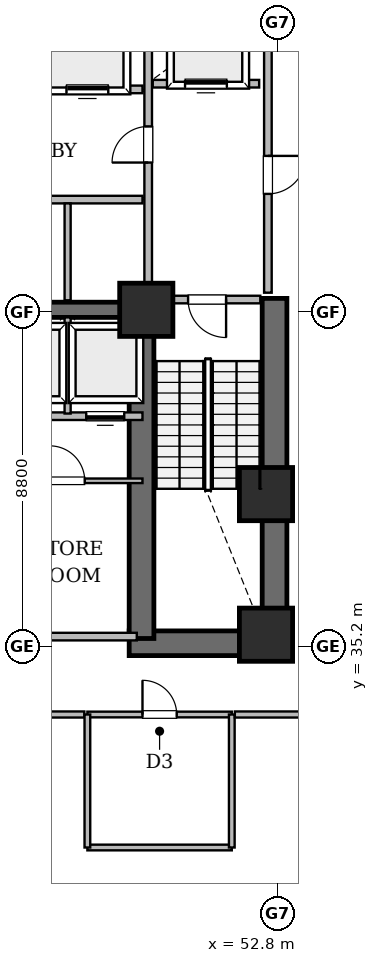
"""IFC4 building model, lengths in metres.
Left out: names, types, materials, properties, quantities, classifications, styles, units other than length and angle.
Written with IfcOpenShell. Run it as: python <this file> out.ifc"""

import sys

from ifc_helpers import new_model, si_unit, direction, frame, frame_2d, origin, origin_2d, place, context, subcontext, project, spatial, rectangle, extrude, element, fill, save


model = new_model("IFC4")
c1 = context("Model", 3, precision=1e-05, world=origin(), true_north=direction((0.0, 1.0)))
c2 = subcontext(c1, "Body", "Model", "MODEL_VIEW")
j1 = project(units=[si_unit("LENGTHUNIT", "METRE"), si_unit("PLANEANGLEUNIT", "RADIAN")], contexts=[c1])
p1 = place(None, origin())
s1 = spatial("IfcSite", under=j1, at=p1, CompositionType="ELEMENT")
p2 = place(p1, origin())
s2 = spatial("IfcBuilding", under=s1, at=p2, CompositionType="ELEMENT")
p3 = place(p2, frame((0.0, 0.0, 19.2)))
s3 = spatial("IfcBuildingStorey", under=s2, at=p3, CompositionType="ELEMENT", Elevation=19.2)
p4 = place(p3, frame((48.9, 35.275, 0.0), z_axis=(0.0, 0.0, 1.0), x_axis=(1.0, 0.0, 0.0)))
e1 = element("IfcWall", 1, at=p4, inside=s3, PredefinedType="SHEAR", context=c2, shape_type="SweptSolid", body=[
    extrude(rectangle(XDim=4.15, YDim=0.65, at=frame_2d((2.075, 0.0))), origin(), (0.0, 0.0, 1.0), 4.35),
])
p5 = place(p3, frame((52.725, 34.95, 0.0), z_axis=(0.0, 0.0, 1.0), x_axis=(0.0, 1.0, 0.0)))
e2 = element("IfcWall", 2, at=p5, inside=s3, PredefinedType="SHEAR", context=c2, shape_type="SweptSolid", body=[
    extrude(rectangle(XDim=9.4, YDim=0.65, at=frame_2d((4.7, 0.0))), origin(), (0.0, 0.0, 1.0), 4.35),
])
p6 = place(p3, frame((49.225, 35.4, 0.0), z_axis=(0.0, 0.0, 1.0), x_axis=(0.0, 1.0, 0.0)))
e3 = element("IfcWall", 3, at=p6, inside=s3, PredefinedType="SHEAR", context=c2, shape_type="SweptSolid", body=[
    extrude(rectangle(XDim=8.95, YDim=0.65, at=frame_2d((4.475, 0.0))), origin(), (0.0, 0.0, 1.0), 4.35),
])
p7 = place(p3, frame((45.05, 44.05, 0.0), z_axis=(0.0, 0.0, 1.0), x_axis=(1.0, 0.0, 0.0)))
e4 = element("IfcWall", 4, at=p7, inside=s3, PredefinedType="SHEAR", context=c2, shape_type="SweptSolid", body=[
    extrude(rectangle(XDim=4.2, YDim=0.4, at=frame_2d((2.1, 0.0))), origin(), (0.0, 0.0, 1.0), 4.35),
])
for number, where, z_axis, x_axis in (
    (5, (52.5, 35.5, 0.0), (0.0, 0.0, 1.0), (1.0, 0.0, 0.0)),
    (6, (52.5, 39.2, 0.0), (0.0, 0.0, 1.0), (1.0, 0.0, 0.0)),
    (7, (49.35, 44.05, 0.0), (0.0, 0.0, 1.0), (1.0, 0.0, 0.0)),
):
    element("IfcColumn", number, at=place(p3, frame(where, z_axis=z_axis, x_axis=x_axis)), inside=s3, PredefinedType="COLUMN", context=c2, shape_type="SweptSolid", body=[
        extrude(rectangle(XDim=1.4, YDim=1.4, at=origin_2d()), origin(), (0.0, 0.0, 1.0), 4.8),
    ])
p8 = place(p3, frame((38.9, 35.45, 0.0), z_axis=(0.0, 0.0, 1.0), x_axis=(1.0, 0.0, 0.0)))
e8 = element("IfcWall", 8, at=p8, inside=s3, PredefinedType="SOLIDWALL", context=c2, shape_type="SweptSolid", body=[
    extrude(rectangle(XDim=10.2, YDim=0.2, at=frame_2d((5.1, 0.0))), origin(), (0.0, 0.0, 1.0), 4.35),
])
p9 = place(p8, frame((4.6, 0.0, 0.0)))
e9 = element("IfcOpeningElement", 9, at=p9, cuts=e8, PredefinedType="OPENING", context=c2, shape_type="SweptSolid", body=[
    extrude(rectangle(XDim=1.0, YDim=2.15, at=frame_2d((0.5, 1.075))), frame((0.0, 0.11, 0.0), z_axis=(0.0, -1.0, 0.0), x_axis=(1.0, 0.0, 0.0)), (0.0, 0.0, 1.0), 0.22),
])
p10 = place(p3, frame((52.55, 44.5, 0.0), z_axis=(0.0, 0.0, 1.0), x_axis=(0.0, 1.0, 0.0)))
e10 = element("IfcWall", 10, at=p10, inside=s3, PredefinedType="SOLIDWALL", context=c2, shape_type="SweptSolid", body=[
    extrude(rectangle(XDim=7.92, YDim=0.2, at=frame_2d((3.96, 0.0))), origin(), (0.0, 0.0, 1.0), 4.35),
])
p11 = place(p10, frame((2.6, 0.0, 0.0)))
e11 = element("IfcOpeningElement", 11, at=p11, cuts=e10, PredefinedType="OPENING", context=c2, shape_type="SweptSolid", body=[
    extrude(rectangle(XDim=1.0, YDim=2.15, at=frame_2d((0.5, 1.075))), frame((0.0, 0.11, 0.0), z_axis=(0.0, -1.0, 0.0), x_axis=(1.0, 0.0, 0.0)), (0.0, 0.0, 1.0), 0.22),
])
p12 = place(p3, frame((49.4, 44.5, 0.0), z_axis=(0.0, 0.0, 1.0), x_axis=(0.0, 1.0, 0.0)))
e12 = element("IfcWall", 12, at=p12, inside=s3, PredefinedType="SOLIDWALL", context=c2, shape_type="SweptSolid", body=[
    extrude(rectangle(XDim=7.92, YDim=0.2, at=frame_2d((3.96, 0.0))), origin(), (0.0, 0.0, 1.0), 3.438),
])
p13 = place(p12, frame((3.425, 0.0, 0.0)))
e13 = element("IfcOpeningElement", 13, at=p13, cuts=e12, PredefinedType="OPENING", context=c2, shape_type="SweptSolid", body=[
    extrude(rectangle(XDim=0.95, YDim=2.15, at=frame_2d((0.475, 1.075))), frame((0.0, 0.11, 0.0), z_axis=(0.0, -1.0, 0.0), x_axis=(1.0, 0.0, 0.0)), (0.0, 0.0, 1.0), 0.22),
])
p14 = place(p3, frame((43.75, 49.85, 0.0), z_axis=(0.0, 0.0, 1.0), x_axis=(1.0, 0.0, 0.0)))
e14 = element("IfcWall", 14, at=p14, inside=s3, PredefinedType="SOLIDWALL", context=c2, shape_type="SweptSolid", body=[
    extrude(rectangle(XDim=5.5, YDim=0.2, at=frame_2d((2.75, 0.0))), origin(), (0.0, 0.0, 1.0), 3.438),
])
p15 = place(p14, frame((3.5, 0.0, 0.0)))
e15 = element("IfcOpeningElement", 15, at=p15, cuts=e14, PredefinedType="OPENING", context=c2, shape_type="SweptSolid", body=[
    extrude(rectangle(XDim=1.1, YDim=2.15, at=frame_2d((0.55, 1.075))), frame((0.0, 0.11, 0.0), z_axis=(0.0, -1.0, 0.0), x_axis=(1.0, 0.0, 0.0)), (0.0, 0.0, 1.0), 0.22),
])
p16 = place(p3, frame((45.32, 41.25, 0.0), z_axis=(0.0, 0.0, 1.0), x_axis=(1.0, 0.0, 0.0)))
e16 = element("IfcWall", 16, at=p16, inside=s3, PredefinedType="SOLIDWALL", context=c2, shape_type="SweptSolid", body=[
    extrude(rectangle(XDim=3.93, YDim=0.2, at=frame_2d((1.965, 0.0))), origin(), (0.0, 0.0, 1.0), 4.35),
])
p17 = place(p16, frame((0.45, 0.0, 0.0)))
e17 = element("IfcOpeningElement", 17, at=p17, cuts=e16, PredefinedType="OPENING", context=c2, shape_type="SweptSolid", body=[
    extrude(rectangle(XDim=1.0, YDim=2.15, at=frame_2d((0.5, 1.075))), frame((0.0, 0.11, 0.0), z_axis=(0.0, -1.0, 0.0), x_axis=(1.0, 0.0, 0.0)), (0.0, 0.0, 1.0), 0.22),
])
p18 = place(p16, frame((2.45, 0.0, 0.0)))
e18 = element("IfcOpeningElement", 18, at=p18, cuts=e16, PredefinedType="OPENING", context=c2, shape_type="SweptSolid", body=[
    extrude(rectangle(XDim=1.0, YDim=2.15, at=frame_2d((0.5, 1.075))), frame((0.0, 0.11, 0.0), z_axis=(0.0, -1.0, 0.0), x_axis=(1.0, 0.0, 0.0)), (0.0, 0.0, 1.0), 0.22),
])
p19 = place(p3, frame((45.32, 39.55, 0.0), z_axis=(0.0, 0.0, 1.0), x_axis=(1.0, 0.0, 0.0)))
e19 = element("IfcWall", 19, at=p19, inside=s3, PredefinedType="PARTITIONING", context=c2, shape_type="SweptSolid", body=[
    extrude(rectangle(XDim=3.93, YDim=0.12, at=frame_2d((1.965, 0.0))), origin(), (0.0, 0.0, 1.0), 4.35),
])
p20 = place(p19, frame((1.49, 0.0, 0.0)))
e20 = element("IfcOpeningElement", 20, at=p20, cuts=e19, PredefinedType="OPENING", context=c2, shape_type="SweptSolid", body=[
    extrude(rectangle(XDim=0.92, YDim=2.1, at=frame_2d((0.46, 1.05))), frame((0.0, 0.07, 0.0), z_axis=(0.0, -1.0, 0.0), x_axis=(1.0, 0.0, 0.0)), (0.0, 0.0, 1.0), 0.14),
])
p21 = place(p3, frame((47.8, 33.4, 0.0), z_axis=(0.0, 0.0, 1.0), x_axis=(1.0, 0.0, 0.0)))
e21 = element("IfcWall", 21, at=p21, inside=s3, PredefinedType="PLUMBINGWALL", context=c2, shape_type="SweptSolid", body=[
    extrude(rectangle(XDim=3.8, YDim=0.15, at=frame_2d((1.9, 0.0))), origin(), (0.0, 0.0, 1.0), 3.638),
])
p22 = place(p21, frame((1.45, 0.0, 0.0)))
e22 = element("IfcOpeningElement", 22, at=p22, cuts=e21, PredefinedType="OPENING", context=c2, shape_type="SweptSolid", body=[
    extrude(rectangle(XDim=0.9, YDim=2.1, at=frame_2d((0.45, 1.05))), frame((0.0, 0.085, 0.0), z_axis=(0.0, -1.0, 0.0), x_axis=(1.0, 0.0, 0.0)), (0.0, 0.0, 1.0), 0.17),
])
p23 = place(p3, frame((49.55, 44.32, 0.0), z_axis=(0.0, 0.0, 1.0), x_axis=(1.0, 0.0, 0.0)))
e23 = element("IfcWall", 23, at=p23, inside=s3, PredefinedType="SOLIDWALL", context=c2, shape_type="SweptSolid", body=[
    extrude(rectangle(XDim=2.8, YDim=0.2, at=frame_2d((1.4, 0.0))), origin(), (0.0, 0.0, 1.0), 3.438),
])
p24 = place(p23, frame((0.9, 0.0, 0.0)))
e24 = element("IfcOpeningElement", 24, at=p24, cuts=e23, PredefinedType="OPENING", context=c2, shape_type="SweptSolid", body=[
    extrude(rectangle(XDim=1.0, YDim=2.15, at=frame_2d((0.5, 1.075))), frame((0.0, 0.11, 0.0), z_axis=(0.0, -1.0, 0.0), x_axis=(1.0, 0.0, 0.0)), (0.0, 0.0, 1.0), 0.22),
])
p25 = place(p3, frame((49.52, 50.0, 0.0), z_axis=(0.0, 0.0, 1.0), x_axis=(1.0, 0.0, 0.0)))
e25 = element("IfcWall", 25, at=p25, inside=s3, PredefinedType="SOLIDWALL", context=c2, shape_type="SweptSolid", body=[
    extrude(rectangle(XDim=2.8, YDim=0.2, at=frame_2d((1.4, 0.0))), origin(), (0.0, 0.0, 1.0), 4.35),
])
p26 = place(p25, frame((0.85, 0.0, 0.0)))
e26 = element("IfcOpeningElement", 26, at=p26, cuts=e25, PredefinedType="OPENING", context=c2, shape_type="SweptSolid", body=[
    extrude(rectangle(XDim=1.1, YDim=2.15, at=frame_2d((0.55, 1.075))), frame((0.0, 0.11, 0.0), z_axis=(0.0, -1.0, 0.0), x_axis=(1.0, 0.0, 0.0)), (0.0, 0.0, 1.0), 0.22),
])
p27 = place(p3, frame((43.08, 33.4, 0.0), z_axis=(0.0, 0.0, 1.0), x_axis=(1.0, 0.0, 0.0)))
e27 = element("IfcWall", 27, at=p27, inside=s3, PredefinedType="SOLIDWALL", context=c2, shape_type="SweptSolid", body=[
    extrude(rectangle(XDim=4.64, YDim=0.16, at=frame_2d((2.32, 0.0))), origin(), (0.0, 0.0, 1.0), 4.35),
])
p28 = place(p3, frame((45.32, 46.95, 0.0), z_axis=(0.0, 0.0, 1.0), x_axis=(1.0, 0.0, 0.0)))
e28 = element("IfcWall", 28, at=p28, inside=s3, PredefinedType="SOLIDWALL", context=c2, shape_type="SweptSolid", body=[
    extrude(rectangle(XDim=3.93, YDim=0.2, at=frame_2d((1.965, 0.0))), origin(), (0.0, 0.0, 1.0), 3.438),
])
p29 = place(p3, frame((47.8, 29.9, 0.0), z_axis=(0.0, 0.0, 1.0), x_axis=(1.0, 0.0, 0.0)))
e29 = element("IfcWall", 29, at=p29, inside=s3, PredefinedType="PLUMBINGWALL", context=c2, shape_type="SweptSolid", body=[
    extrude(rectangle(XDim=3.8, YDim=0.15, at=frame_2d((1.9, 0.0))), origin(), (0.0, 0.0, 1.0), 4.35),
])
for number, where, z_axis, x_axis in (
    (30, (47.8, 33.4, 0.0), (0.0, 0.0, 1.0), (0.0, -1.0, 0.0)),
    (31, (51.6, 29.9, 0.0), (0.0, 0.0, 1.0), (0.0, 1.0, 0.0)),
):
    element("IfcWall", number, at=place(p3, frame(where, z_axis=z_axis, x_axis=x_axis)), inside=s3, PredefinedType="PLUMBINGWALL", context=c2, shape_type="SweptSolid", body=[
        extrude(rectangle(XDim=3.5, YDim=0.15, at=frame_2d((1.75, 0.0))), origin(), (0.0, 0.0, 1.0), 3.638),
    ])
p30 = place(p3, frame((51.68, 33.4, 0.0), z_axis=(0.0, 0.0, 1.0), x_axis=(1.0, 0.0, 0.0)))
e32 = element("IfcWall", 32, at=p30, inside=s3, PredefinedType="SOLIDWALL", context=c2, shape_type="SweptSolid", body=[
    extrude(rectangle(XDim=2.84, YDim=0.16, at=frame_2d((1.42, 0.0))), origin(), (0.0, 0.0, 1.0), 3.638),
])
p31 = place(p3, frame((47.28, 44.3, 0.0), z_axis=(0.0, 0.0, 1.0), x_axis=(0.0, 1.0, 0.0)))
e33 = element("IfcWall", 33, at=p31, inside=s3, PredefinedType="SOLIDWALL", context=c2, shape_type="SweptSolid", body=[
    extrude(rectangle(XDim=2.55, YDim=0.16, at=frame_2d((1.275, 0.0))), origin(), (0.0, 0.0, 1.0), 3.438),
])
p32 = place(p3, frame((47.28, 41.32, 0.0), z_axis=(0.0, 0.0, 1.0), x_axis=(0.0, 1.0, 0.0)))
e34 = element("IfcWall", 34, at=p32, inside=s3, PredefinedType="SOLIDWALL", context=c2, shape_type="SweptSolid", body=[
    extrude(rectangle(XDim=2.53, YDim=0.16, at=frame_2d((1.265, 0.0))), origin(), (0.0, 0.0, 1.0), 4.35),
])
p33 = place(p24, frame((1.0, 0.0, 0.0), z_axis=(0.0, 0.0, 1.0), x_axis=(-1.0, 0.0, 0.0)))
e35 = element("IfcDoor", 35, at=p33, inside=s3, OperationType="SINGLE_SWING_RIGHT", PredefinedType="DOOR", context=c2, shape_type="SweptSolid", body=[
    extrude(rectangle(XDim=1.0, YDim=2.15, at=frame_2d((0.5, 1.075))), frame((0.0, 0.025, 0.0), z_axis=(0.0, -1.0, 0.0), x_axis=(1.0, 0.0, 0.0)), (0.0, 0.0, 1.0), 0.05),
])
fill(e24, e35)
p34 = place(p11, frame((1.0, 0.0, 0.0), z_axis=(0.0, 0.0, 1.0), x_axis=(-1.0, 0.0, 0.0)))
e36 = element("IfcDoor", 36, at=p34, inside=s3, OperationType="SINGLE_SWING_RIGHT", PredefinedType="DOOR", context=c2, shape_type="SweptSolid", body=[
    extrude(rectangle(XDim=1.0, YDim=2.15, at=frame_2d((0.5, 1.075))), frame((0.0, 0.025, 0.0), z_axis=(0.0, -1.0, 0.0), x_axis=(1.0, 0.0, 0.0)), (0.0, 0.0, 1.0), 0.05),
])
fill(e11, e36)
p35 = place(p13, origin())
e37 = element("IfcDoor", 37, at=p35, inside=s3, OperationType="SINGLE_SWING_LEFT", PredefinedType="DOOR", context=c2, shape_type="SweptSolid", body=[
    extrude(rectangle(XDim=0.95, YDim=2.15, at=frame_2d((0.475, 1.075))), frame((0.0, 0.025, 0.0), z_axis=(0.0, -1.0, 0.0), x_axis=(1.0, 0.0, 0.0)), (0.0, 0.0, 1.0), 0.05),
])
fill(e13, e37)
p36 = place(p26, origin())
e38 = element("IfcDoor", 38, at=p36, inside=s3, OperationType="SLIDING_TO_LEFT", PredefinedType="DOOR", context=c2, shape_type="SweptSolid", body=[
    extrude(rectangle(XDim=1.1, YDim=2.15, at=frame_2d((0.55, 1.075))), frame((0.0, 0.025, 0.0), z_axis=(0.0, -1.0, 0.0), x_axis=(1.0, 0.0, 0.0)), (0.0, 0.0, 1.0), 0.05),
])
fill(e26, e38)
p37 = place(p15, origin())
e39 = element("IfcDoor", 39, at=p37, inside=s3, OperationType="SLIDING_TO_LEFT", PredefinedType="DOOR", context=c2, shape_type="SweptSolid", body=[
    extrude(rectangle(XDim=1.1, YDim=2.15, at=frame_2d((0.55, 1.075))), frame((0.0, 0.025, 0.0), z_axis=(0.0, -1.0, 0.0), x_axis=(1.0, 0.0, 0.0)), (0.0, 0.0, 1.0), 0.05),
])
fill(e15, e39)
p38 = place(p18, frame((1.0, 0.0, 0.0), z_axis=(0.0, 0.0, 1.0), x_axis=(-1.0, 0.0, 0.0)))
e40 = element("IfcDoor", 40, at=p38, inside=s3, OperationType="SLIDING_TO_LEFT", PredefinedType="DOOR", context=c2, shape_type="SweptSolid", body=[
    extrude(rectangle(XDim=1.0, YDim=2.15, at=frame_2d((0.5, 1.075))), frame((0.0, 0.025, 0.0), z_axis=(0.0, -1.0, 0.0), x_axis=(1.0, 0.0, 0.0)), (0.0, 0.0, 1.0), 0.05),
])
fill(e18, e40)
p39 = place(p20, origin())
e41 = element("IfcDoor", 41, at=p39, inside=s3, OperationType="SINGLE_SWING_LEFT", PredefinedType="DOOR", context=c2, shape_type="SweptSolid", body=[
    extrude(rectangle(XDim=0.92, YDim=2.1, at=frame_2d((0.46, 1.05))), frame((0.0, 0.025, 0.0), z_axis=(0.0, -1.0, 0.0), x_axis=(1.0, 0.0, 0.0)), (0.0, 0.0, 1.0), 0.05),
])
fill(e20, e41)
p40 = place(p22, origin())
e42 = element("IfcDoor", 42, at=p40, inside=s3, OperationType="SINGLE_SWING_LEFT", PredefinedType="DOOR", context=c2, shape_type="SweptSolid", body=[
    extrude(rectangle(XDim=0.9, YDim=2.1, at=frame_2d((0.45, 1.05))), frame((0.0, 0.025, 0.0), z_axis=(0.0, -1.0, 0.0), x_axis=(1.0, 0.0, 0.0)), (0.0, 0.0, 1.0), 0.05),
])
fill(e22, e42)
save(model, sys.argv[1])
